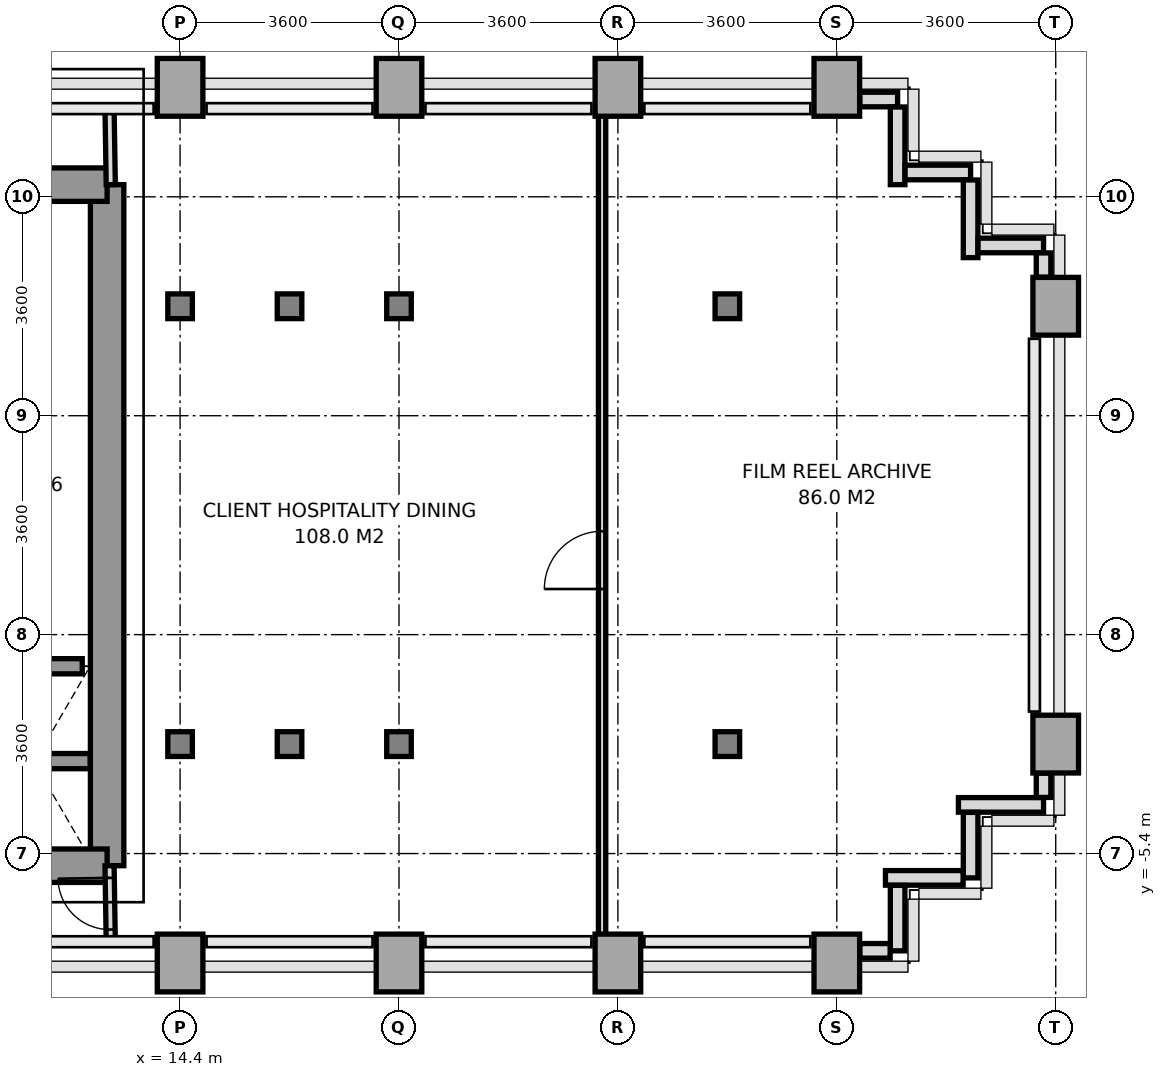
"""IFC4 building model, lengths in metres.
Left out: names, types, materials, properties, quantities, classifications, styles, units other than length and angle.
Written with IfcOpenShell. Run it as: python <this file> out.ifc"""

import sys

from ifc_helpers import new_model, si_unit, direction, frame, frame_2d, origin, origin_2d, place, context, subcontext, project, spatial, rectangle, i_section, extrude, source, transform, mapped, element, fill, save


model = new_model("IFC4")
c1 = context("Model", 3, precision=1e-05, world=origin(), true_north=direction((0.0, 1.0)))
c2 = subcontext(c1, "Body", "Model", "MODEL_VIEW")
j1 = project(units=[si_unit("LENGTHUNIT", "METRE"), si_unit("PLANEANGLEUNIT", "RADIAN")], contexts=[c1])
p1 = place(None, origin())
s1 = spatial("IfcSite", under=j1, at=p1, CompositionType="ELEMENT")
p2 = place(p1, origin())
s2 = spatial("IfcBuilding", under=s1, at=p2, CompositionType="ELEMENT")
p3 = place(p2, frame((0.0, 0.0, 81.6)))
s3 = spatial("IfcBuildingStorey", under=s2, at=p3, CompositionType="ELEMENT", Elevation=81.6)
m1 = source(origin(), c2, "Body", "SweptSolid", [
    extrude(rectangle(XDim=0.75, YDim=0.95, at=origin_2d()), origin(), (0.0, 0.0, 1.0), 3.2),
])
p4 = place(p3, frame((14.4, -7.2, 0.0), z_axis=(0.0, 0.0, 1.0), x_axis=(1.0, 0.0, 0.0)))
e1 = element("IfcColumn", 1, at=p4, inside=s3, PredefinedType="COLUMN", context=c2, shape_type="MappedRepresentation", body=[
    mapped(m1, transform((0.0, 0.0, 0.0), x_axis=(1.0, 0.0, 0.0), y_axis=(0.0, 1.0, 0.0), z_axis=(0.0, 0.0, 1.0), scale=1.0)),
])
m2 = source(origin(), c2, "Body", "SweptSolid", [
    extrude(i_section(OverallWidth=0.404, OverallDepth=0.407, WebThickness=0.022, FlangeThickness=0.035, at=origin_2d()), origin(), (0.0, 0.0, 1.0), 3.2),
])
for number, where, z_axis, x_axis in (
    (2, (14.4, -3.6, 0.0), (0.0, 0.0, 1.0), (1.0, 0.0, 0.0)),
    (3, (14.4, 3.6, 0.0), (0.0, 0.0, 1.0), (1.0, 0.0, 0.0)),
):
    element("IfcColumn", number, at=place(p3, frame(where, z_axis=z_axis, x_axis=x_axis)), inside=s3, PredefinedType="COLUMN", context=c2, shape_type="MappedRepresentation", body=[
        mapped(m2, transform((0.0, 0.0, 0.0), x_axis=(1.0, 0.0, 0.0), y_axis=(0.0, 1.0, 0.0), z_axis=(0.0, 0.0, 1.0), scale=1.0)),
    ])
p5 = place(p3, frame((14.4, 7.2, 0.0), z_axis=(0.0, 0.0, 1.0), x_axis=(1.0, 0.0, 0.0)))
e4 = element("IfcColumn", 4, at=p5, inside=s3, PredefinedType="COLUMN", context=c2, shape_type="MappedRepresentation", body=[
    mapped(m1, transform((0.0, 0.0, 0.0), x_axis=(1.0, 0.0, 0.0), y_axis=(0.0, 1.0, 0.0), z_axis=(0.0, 0.0, 1.0), scale=1.0)),
])
for number, where, z_axis, x_axis in (
    (5, (16.2, -3.6, 0.0), (0.0, 0.0, 1.0), (1.0, 0.0, 0.0)),
    (6, (16.2, 3.6, 0.0), (0.0, 0.0, 1.0), (1.0, 0.0, 0.0)),
):
    element("IfcColumn", number, at=place(p3, frame(where, z_axis=z_axis, x_axis=x_axis)), inside=s3, PredefinedType="COLUMN", context=c2, shape_type="MappedRepresentation", body=[
        mapped(m2, transform((0.0, 0.0, 0.0), x_axis=(1.0, 0.0, 0.0), y_axis=(0.0, 1.0, 0.0), z_axis=(0.0, 0.0, 1.0), scale=1.0)),
    ])
p6 = place(p3, frame((18.0, -7.2, 0.0), z_axis=(0.0, 0.0, 1.0), x_axis=(1.0, 0.0, 0.0)))
e7 = element("IfcColumn", 7, at=p6, inside=s3, PredefinedType="COLUMN", context=c2, shape_type="MappedRepresentation", body=[
    mapped(m1, transform((0.0, 0.0, 0.0), x_axis=(1.0, 0.0, 0.0), y_axis=(0.0, 1.0, 0.0), z_axis=(0.0, 0.0, 1.0), scale=1.0)),
])
for number, where, z_axis, x_axis in (
    (8, (18.0, -3.6, 0.0), (0.0, 0.0, 1.0), (1.0, 0.0, 0.0)),
    (9, (18.0, 3.6, 0.0), (0.0, 0.0, 1.0), (1.0, 0.0, 0.0)),
):
    element("IfcColumn", number, at=place(p3, frame(where, z_axis=z_axis, x_axis=x_axis)), inside=s3, PredefinedType="COLUMN", context=c2, shape_type="MappedRepresentation", body=[
        mapped(m2, transform((0.0, 0.0, 0.0), x_axis=(1.0, 0.0, 0.0), y_axis=(0.0, 1.0, 0.0), z_axis=(0.0, 0.0, 1.0), scale=1.0)),
    ])
for number, where, z_axis, x_axis in (
    (10, (18.0, 7.2, 0.0), (0.0, 0.0, 1.0), (1.0, 0.0, 0.0)),
    (11, (21.6, -7.2, 0.0), (0.0, 0.0, 1.0), (1.0, 0.0, 0.0)),
    (12, (21.6, 7.2, 0.0), (0.0, 0.0, 1.0), (1.0, 0.0, 0.0)),
):
    element("IfcColumn", number, at=place(p3, frame(where, z_axis=z_axis, x_axis=x_axis)), inside=s3, PredefinedType="COLUMN", context=c2, shape_type="MappedRepresentation", body=[
        mapped(m1, transform((0.0, 0.0, 0.0), x_axis=(1.0, 0.0, 0.0), y_axis=(0.0, 1.0, 0.0), z_axis=(0.0, 0.0, 1.0), scale=1.0)),
    ])
for number, where, z_axis, x_axis in (
    (13, (23.4, -3.6, 0.0), (0.0, 0.0, 1.0), (1.0, 0.0, 0.0)),
    (14, (23.4, 3.6, 0.0), (0.0, 0.0, 1.0), (1.0, 0.0, 0.0)),
):
    element("IfcColumn", number, at=place(p3, frame(where, z_axis=z_axis, x_axis=x_axis)), inside=s3, PredefinedType="COLUMN", context=c2, shape_type="MappedRepresentation", body=[
        mapped(m2, transform((0.0, 0.0, 0.0), x_axis=(1.0, 0.0, 0.0), y_axis=(0.0, 1.0, 0.0), z_axis=(0.0, 0.0, 1.0), scale=1.0)),
    ])
for number, where, z_axis, x_axis in (
    (15, (25.2, -7.2, 0.0), (0.0, 0.0, 1.0), (1.0, 0.0, 0.0)),
    (16, (25.2, 7.2, 0.0), (0.0, 0.0, 1.0), (1.0, 0.0, 0.0)),
    (17, (28.8, -3.6, 0.0), (0.0, 0.0, 1.0), (1.0, 0.0, 0.0)),
    (18, (28.8, 3.6, 0.0), (0.0, 0.0, 1.0), (1.0, 0.0, 0.0)),
):
    element("IfcColumn", number, at=place(p3, frame(where, z_axis=z_axis, x_axis=x_axis)), inside=s3, PredefinedType="COLUMN", context=c2, shape_type="MappedRepresentation", body=[
        mapped(m1, transform((0.0, 0.0, 0.0), x_axis=(1.0, 0.0, 0.0), y_axis=(0.0, 1.0, 0.0), z_axis=(0.0, 0.0, 1.0), scale=1.0)),
    ])
p7 = place(p3, frame((28.6, -4.6, 0.0), z_axis=(0.0, 0.0, 1.0), x_axis=(-1.0, 0.0, 0.0)))
e19 = element("IfcWall", 19, at=p7, inside=s3, PredefinedType="PARAPET", context=c2, shape_type="SweptSolid", body=[
    extrude(rectangle(XDim=1.4, YDim=0.24, at=frame_2d((0.7, 0.0))), origin(), (0.0, 0.0, 1.0), 1.15),
])
p8 = place(p3, frame((27.4, -4.723, 0.0), z_axis=(0.0, 0.0, 1.0), x_axis=(0.0, -1.0, 0.0)))
e20 = element("IfcWall", 20, at=p8, inside=s3, PredefinedType="PARAPET", context=c2, shape_type="SweptSolid", body=[
    extrude(rectangle(XDim=1.077, YDim=0.24, at=frame_2d((0.539, 0.0))), origin(), (0.0, 0.0, 1.0), 1.15),
])
p9 = place(p3, frame((27.277, -5.8, 0.0), z_axis=(0.0, 0.0, 1.0), x_axis=(-1.0, 0.0, 0.0)))
e21 = element("IfcWall", 21, at=p9, inside=s3, PredefinedType="PARAPET", context=c2, shape_type="SweptSolid", body=[
    extrude(rectangle(XDim=1.277, YDim=0.24, at=frame_2d((0.639, 0.0))), origin(), (0.0, 0.0, 1.0), 1.15),
])
p10 = place(p3, frame((26.2, -5.923, 0.0), z_axis=(0.0, 0.0, 1.0), x_axis=(0.0, -1.0, 0.0)))
e22 = element("IfcWall", 22, at=p10, inside=s3, PredefinedType="PARAPET", context=c2, shape_type="SweptSolid", body=[
    extrude(rectangle(XDim=1.077, YDim=0.24, at=frame_2d((0.539, 0.0))), origin(), (0.0, 0.0, 1.0), 1.15),
])
p11 = place(p3, frame((26.077, -7.0, 0.0), z_axis=(0.0, 0.0, 1.0), x_axis=(-1.0, 0.0, 0.0)))
e23 = element("IfcWall", 23, at=p11, inside=s3, PredefinedType="PARAPET", context=c2, shape_type="SweptSolid", body=[
    extrude(rectangle(XDim=0.499, YDim=0.24, at=frame_2d((0.25, 0.0))), origin(), (0.0, 0.0, 1.0), 1.15),
])
p12 = place(p3, frame((25.578, 7.0, 0.0), z_axis=(0.0, 0.0, 1.0), x_axis=(1.0, 0.0, 0.0)))
e24 = element("IfcWall", 24, at=p12, inside=s3, PredefinedType="PARAPET", context=c2, shape_type="SweptSolid", body=[
    extrude(rectangle(XDim=0.622, YDim=0.24, at=frame_2d((0.311, 0.0))), origin(), (0.0, 0.0, 1.0), 1.15),
])
p13 = place(p3, frame((26.2, 6.877, 0.0), z_axis=(0.0, 0.0, 1.0), x_axis=(0.0, -1.0, 0.0)))
e25 = element("IfcWall", 25, at=p13, inside=s3, PredefinedType="PARAPET", context=c2, shape_type="SweptSolid", body=[
    extrude(rectangle(XDim=1.277, YDim=0.24, at=frame_2d((0.638, 0.0))), origin(), (0.0, 0.0, 1.0), 1.15),
])
p14 = place(p3, frame((26.323, 5.8, 0.0), z_axis=(0.0, 0.0, 1.0), x_axis=(1.0, 0.0, 0.0)))
e26 = element("IfcWall", 26, at=p14, inside=s3, PredefinedType="PARAPET", context=c2, shape_type="SweptSolid", body=[
    extrude(rectangle(XDim=1.077, YDim=0.24, at=frame_2d((0.539, 0.0))), origin(), (0.0, 0.0, 1.0), 1.15),
])
p15 = place(p3, frame((27.4, 5.677, 0.0), z_axis=(0.0, 0.0, 1.0), x_axis=(0.0, -1.0, 0.0)))
e27 = element("IfcWall", 27, at=p15, inside=s3, PredefinedType="PARAPET", context=c2, shape_type="SweptSolid", body=[
    extrude(rectangle(XDim=1.277, YDim=0.24, at=frame_2d((0.639, 0.0))), origin(), (0.0, 0.0, 1.0), 1.15),
])
p16 = place(p3, frame((27.523, 4.6, 0.0), z_axis=(0.0, 0.0, 1.0), x_axis=(1.0, 0.0, 0.0)))
e28 = element("IfcWall", 28, at=p16, inside=s3, PredefinedType="PARAPET", context=c2, shape_type="SweptSolid", body=[
    extrude(rectangle(XDim=1.077, YDim=0.24, at=frame_2d((0.539, 0.0))), origin(), (0.0, 0.0, 1.0), 1.15),
])
for number, where, z_axis, x_axis in (
    (29, (28.6, 4.477, 0.0), (0.0, 0.0, 1.0), (0.0, -1.0, 0.0)),
    (30, (28.6, -4.078, 0.0), (0.0, 0.0, 1.0), (0.0, -1.0, 0.0)),
):
    element("IfcWall", number, at=place(p3, frame(where, z_axis=z_axis, x_axis=x_axis)), inside=s3, PredefinedType="PARAPET", context=c2, shape_type="SweptSolid", body=[
        extrude(rectangle(XDim=0.399, YDim=0.24, at=frame_2d((0.2, 0.0))), origin(), (0.0, 0.0, 1.0), 1.15),
    ])
p17 = place(p3, frame((13.2, -5.6, 0.0), z_axis=(0.0, 0.0, 1.0), x_axis=(0.0, 1.0, 0.0)))
e31 = element("IfcWall", 31, at=p17, inside=s3, PredefinedType="SHEAR", context=c2, shape_type="SweptSolid", body=[
    extrude(rectangle(XDim=11.2, YDim=0.55, at=frame_2d((5.6, 0.0))), origin(), (0.0, 0.0, 1.0), 3.2),
])
p18 = place(p3, frame((11.381, 5.6, 0.0), z_axis=(0.0, 0.0, 1.0), x_axis=(1.0, 0.0, 0.0)))
e32 = element("IfcWall", 32, at=p18, inside=s3, PredefinedType="SHEAR", context=c2, shape_type="SweptSolid", body=[
    extrude(rectangle(XDim=1.819, YDim=0.55, at=frame_2d((0.909, 0.0))), origin(), (0.0, 0.0, 1.0), 3.2),
])
p19 = place(p3, frame((5.4, -5.6, 0.0), z_axis=(0.0, 0.0, 1.0), x_axis=(1.0, 0.0, 0.0)))
e33 = element("IfcWall", 33, at=p19, inside=s3, PredefinedType="SHEAR", context=c2, shape_type="SweptSolid", body=[
    extrude(rectangle(XDim=7.8, YDim=0.55, at=frame_2d((3.9, 0.0))), origin(), (0.0, 0.0, 1.0), 3.2),
])
p20 = place(p19, frame((3.0, 0.0, 0.0)))
e34 = element("IfcOpeningElement", 34, at=p20, cuts=e33, PredefinedType="OPENING", context=c2, shape_type="SweptSolid", body=[
    extrude(rectangle(XDim=1.2, YDim=2.2, at=frame_2d((0.6, 1.1))), frame((0.0, 0.285, 0.0), z_axis=(0.0, -1.0, 0.0), x_axis=(1.0, 0.0, 0.0)), (0.0, 0.0, 1.0), 0.57),
])
p21 = place(p3, frame((11.08, -3.88, 0.0), z_axis=(0.0, 0.0, 1.0), x_axis=(1.0, 0.0, 0.0)))
e35 = element("IfcWall", 35, at=p21, inside=s3, PredefinedType="SOLIDWALL", context=c2, shape_type="SweptSolid", body=[
    extrude(rectangle(XDim=1.84, YDim=0.25, at=frame_2d((0.92, 0.0))), origin(), (0.0, 0.0, 1.0), 3.2),
])
p22 = place(p3, frame((11.209, -2.32, 0.0), z_axis=(0.0, 0.0, 1.0), x_axis=(1.0, 0.0, 0.0)))
e36 = element("IfcWall", 36, at=p22, inside=s3, PredefinedType="SOLIDWALL", context=c2, shape_type="SweptSolid", body=[
    extrude(rectangle(XDim=1.582, YDim=0.25, at=frame_2d((0.791, 0.0))), origin(), (0.0, 0.0, 1.0), 3.2),
])
p23 = place(p3, frame((13.26, 5.6, 0.0), z_axis=(0.0, 0.0, 1.0), x_axis=(-0.016013571389, 0.999871774545, 0.0)))
e37 = element("IfcWall", 37, at=p23, inside=s3, PredefinedType="PARTITIONING", context=c2, shape_type="SweptSolid", body=[
    extrude(rectangle(XDim=1.25, YDim=0.15, at=frame_2d((0.625, 0.0))), origin(), (0.0, 0.0, 1.0), 3.2),
])
p24 = place(p3, frame((13.26, -6.85, 0.0), z_axis=(0.0, 0.0, 1.0), x_axis=(-0.016013571389, 0.999871774545, 0.0)))
e38 = element("IfcWall", 38, at=p24, inside=s3, PredefinedType="PARTITIONING", context=c2, shape_type="SweptSolid", body=[
    extrude(rectangle(XDim=1.25, YDim=0.15, at=frame_2d((0.625, 0.0))), origin(), (0.0, 0.0, 1.0), 3.2),
])
p25 = place(p24, frame((0.2, 0.0, 0.0)))
e39 = element("IfcOpeningElement", 39, at=p25, cuts=e38, PredefinedType="OPENING", context=c2, shape_type="SweptSolid", body=[
    extrude(rectangle(XDim=0.85, YDim=2.1, at=frame_2d((0.425, 1.05))), frame((0.0, 0.085, 0.0), z_axis=(0.0, -1.0, 0.0), x_axis=(1.0, 0.0, 0.0)), (0.0, 0.0, 1.0), 0.17),
])
p26 = place(p3, frame((21.34, -6.85, 0.0), z_axis=(0.0, 0.0, 1.0), x_axis=(0.0, 1.0, 0.0)))
e40 = element("IfcWall", 40, at=p26, inside=s3, PredefinedType="PARTITIONING", context=c2, shape_type="SweptSolid", body=[
    extrude(rectangle(XDim=13.7, YDim=0.12, at=frame_2d((6.85, 0.0))), origin(), (0.0, 0.0, 1.0), 2.71),
])
p27 = place(p26, frame((5.8, 0.0, 0.0)))
e41 = element("IfcOpeningElement", 41, at=p27, cuts=e40, PredefinedType="OPENING", context=c2, shape_type="SweptSolid", body=[
    extrude(rectangle(XDim=0.95, YDim=2.15, at=frame_2d((0.475, 1.075))), frame((0.0, 0.07, 0.0), z_axis=(0.0, -1.0, 0.0), x_axis=(1.0, 0.0, 0.0)), (0.0, 0.0, 1.0), 0.14),
])
m3 = source(origin(), c2, "Body", "SweptSolid", [
    extrude(rectangle(XDim=0.85, YDim=2.1, at=frame_2d((0.425, 1.05))), frame((0.0, 0.025, 0.0), z_axis=(0.0, -1.0, 0.0), x_axis=(1.0, 0.0, 0.0)), (0.0, 0.0, 1.0), 0.05),
])
p28 = place(p25, origin())
e42 = element("IfcDoor", 42, at=p28, inside=s3, OperationType="SINGLE_SWING_RIGHT", PredefinedType="DOOR", context=c2, shape_type="MappedRepresentation", body=[
    mapped(m3, transform((0.0, 0.0, 0.0), x_axis=(1.0, 0.0, 0.0), y_axis=(0.0, 1.0, 0.0), z_axis=(0.0, 0.0, 1.0), scale=1.0)),
])
fill(e39, e42)
m4 = source(origin(), c2, "Body", "SweptSolid", [
    extrude(rectangle(XDim=0.95, YDim=2.15, at=frame_2d((0.475, 1.075))), frame((0.0, 0.025, 0.0), z_axis=(0.0, -1.0, 0.0), x_axis=(1.0, 0.0, 0.0)), (0.0, 0.0, 1.0), 0.05),
])
p29 = place(p27, origin())
e43 = element("IfcDoor", 43, at=p29, inside=s3, OperationType="SINGLE_SWING_LEFT", PredefinedType="DOOR", context=c2, shape_type="MappedRepresentation", body=[
    mapped(m4, transform((0.0, 0.0, 0.0), x_axis=(1.0, 0.0, 0.0), y_axis=(0.0, 1.0, 0.0), z_axis=(0.0, 0.0, 1.0), scale=1.0)),
])
fill(e41, e43)
save(model, sys.argv[1])
